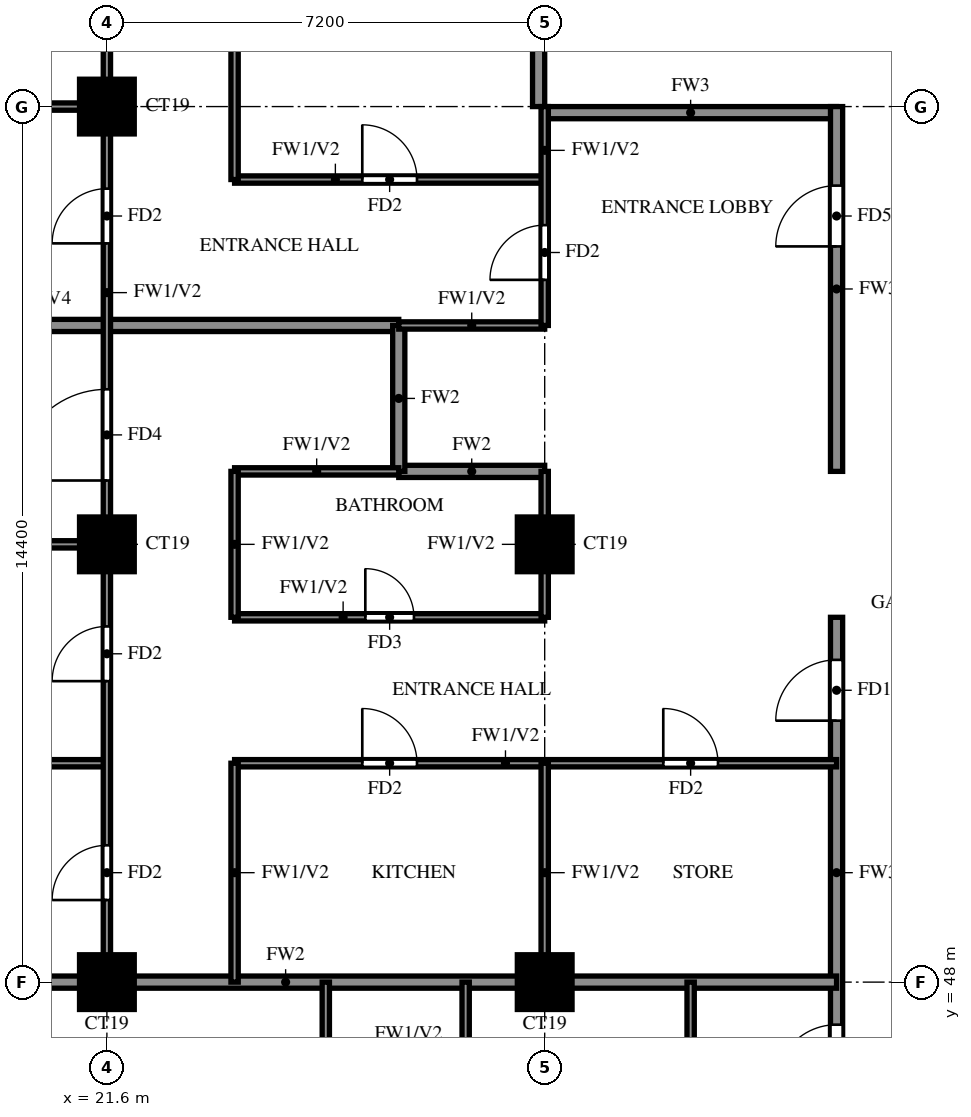
"""IFC4 building model, lengths in metres.
Left out: names, types, materials, properties, quantities, classifications, styles, units other than length and angle.
Written with IfcOpenShell. Run it as: python <this file> out.ifc"""

import sys

from ifc_helpers import new_model, si_unit, direction, frame, frame_2d, origin, origin_2d, place, context, subcontext, project, spatial, rectangle, extrude, source, transform, mapped, element, fill, save


model = new_model("IFC4")
c1 = context("Model", 3, precision=1e-05, world=origin(), true_north=direction((0.0, 1.0)))
c2 = subcontext(c1, "Body", "Model", "MODEL_VIEW")
j1 = project(units=[si_unit("LENGTHUNIT", "METRE"), si_unit("PLANEANGLEUNIT", "RADIAN")], contexts=[c1])
p1 = place(None, origin())
s1 = spatial("IfcSite", under=j1, at=p1, CompositionType="ELEMENT")
p2 = place(p1, origin())
s2 = spatial("IfcBuilding", under=s1, at=p2, CompositionType="ELEMENT")
p3 = place(p2, frame((0.0, 0.0, 185.0)))
s3 = spatial("IfcBuildingStorey", under=s2, at=p3, CompositionType="ELEMENT", Elevation=185.0)
m1 = source(origin(), c2, "Body", "SweptSolid", [
    extrude(rectangle(XDim=0.9, YDim=0.9, at=origin_2d()), origin(), (0.0, 0.0, 1.0), 3.2),
])
for number, where, z_axis, x_axis in (
    (1, (21.6, 48.0, 0.0), (0.0, 0.0, 1.0), (1.0, 0.0, 0.0)),
    (2, (28.8, 48.0, 0.0), (0.0, 0.0, 1.0), (1.0, 0.0, 0.0)),
    (3, (21.6, 55.2, 0.0), (0.0, 0.0, 1.0), (1.0, 0.0, 0.0)),
    (4, (28.8, 55.2, 0.0), (0.0, 0.0, 1.0), (1.0, 0.0, 0.0)),
    (5, (21.6, 62.4, 0.0), (0.0, 0.0, 1.0), (1.0, 0.0, 0.0)),
):
    element("IfcColumn", number, at=place(p3, frame(where, z_axis=z_axis, x_axis=x_axis)), inside=s3, PredefinedType="COLUMN", context=c2, shape_type="MappedRepresentation", body=[
        mapped(m1, transform((0.0, 0.0, 0.0))),
    ])
p4 = place(p3, frame((28.8, 62.3, 0.0), z_axis=(0.0, 0.0, 1.0), x_axis=(1.0, 0.0, 0.0)))
e6 = element("IfcWall", 6, at=p4, inside=s3, PredefinedType="SOLIDWALL", context=c2, shape_type="SweptSolid", body=[
    extrude(rectangle(XDim=4.8, YDim=0.2, at=frame_2d((2.4, 0.0))), origin(), (0.0, 0.0, 1.0), 3.2),
])
p5 = place(p3, frame((28.7, 62.4, 0.0), z_axis=(0.0, 0.0, 1.0), x_axis=(0.0, 1.0, 0.0)))
e7 = element("IfcWall", 7, at=p5, inside=s3, PredefinedType="SOLIDWALL", context=c2, shape_type="SweptSolid", body=[
    extrude(rectangle(XDim=15.6, YDim=0.2, at=frame_2d((7.8, 0.0))), origin(), (0.0, 0.0, 1.0), 3.2),
])
p6 = place(p3, frame((33.6, 45.6, 0.0), z_axis=(0.0, 0.0, 1.0), x_axis=(0.0, 1.0, 0.0)))
e8 = element("IfcWall", 8, at=p6, inside=s3, PredefinedType="SOLIDWALL", context=c2, shape_type="SweptSolid", body=[
    extrude(rectangle(XDim=8.4, YDim=0.2, at=frame_2d((4.2, 0.0))), origin(), (0.0, 0.0, 1.0), 3.2),
])
p7 = place(p6, frame((0.7, 0.0, 0.0)))
e9 = element("IfcOpeningElement", 9, at=p7, cuts=e8, PredefinedType="OPENING", context=c2, shape_type="SweptSolid", body=[
    extrude(rectangle(XDim=1.0, YDim=2.1, at=frame_2d((0.5, 1.05))), frame((0.0, 0.11, 0.0), z_axis=(0.0, -1.0, 0.0), x_axis=(1.0, 0.0, 0.0)), (0.0, 0.0, 1.0), 0.22),
])
p8 = place(p6, frame((6.7, 0.0, 0.0)))
e10 = element("IfcOpeningElement", 10, at=p8, cuts=e8, PredefinedType="OPENING", context=c2, shape_type="SweptSolid", body=[
    extrude(rectangle(XDim=1.0, YDim=2.1, at=frame_2d((0.5, 1.05))), frame((0.0, 0.11, 0.0), z_axis=(0.0, -1.0, 0.0), x_axis=(1.0, 0.0, 0.0)), (0.0, 0.0, 1.0), 0.22),
])
p9 = place(p3, frame((33.6, 56.4, 0.0), z_axis=(0.0, 0.0, 1.0), x_axis=(0.0, 1.0, 0.0)))
e11 = element("IfcWall", 11, at=p9, inside=s3, PredefinedType="SOLIDWALL", context=c2, shape_type="SweptSolid", body=[
    extrude(rectangle(XDim=6.0, YDim=0.2, at=frame_2d((3.0, 0.0))), origin(), (0.0, 0.0, 1.0), 3.2),
])
p10 = place(p9, frame((3.7, 0.0, 0.0)))
e12 = element("IfcOpeningElement", 12, at=p10, cuts=e11, PredefinedType="OPENING", context=c2, shape_type="SweptSolid", body=[
    extrude(rectangle(XDim=1.0, YDim=2.1, at=frame_2d((0.5, 1.05))), frame((0.0, 0.11, 0.0), z_axis=(0.0, -1.0, 0.0), x_axis=(1.0, 0.0, 0.0)), (0.0, 0.0, 1.0), 0.22),
])
p11 = place(p3, frame((14.525, 48.0, 0.0), z_axis=(0.0, 0.0, 1.0), x_axis=(1.0, 0.0, 0.0)))
e13 = element("IfcWall", 13, at=p11, inside=s3, PredefinedType="SOLIDWALL", context=c2, shape_type="SweptSolid", body=[
    extrude(rectangle(XDim=19.075, YDim=0.2, at=frame_2d((9.538, 0.0))), origin(), (0.0, 0.0, 1.0), 3.2),
])
p12 = place(p3, frame((26.4, 56.4, 0.0), z_axis=(0.0, 0.0, 1.0), x_axis=(1.0, 0.0, 0.0)))
e14 = element("IfcWall", 14, at=p12, inside=s3, PredefinedType="SOLIDWALL", context=c2, shape_type="SweptSolid", body=[
    extrude(rectangle(XDim=2.4, YDim=0.2, at=frame_2d((1.2, 0.0))), origin(), (0.0, 0.0, 1.0), 3.2),
])
p13 = place(p3, frame((14.525, 58.8, 0.0), z_axis=(0.0, 0.0, 1.0), x_axis=(1.0, 0.0, 0.0)))
e15 = element("IfcWall", 15, at=p13, inside=s3, PredefinedType="SOLIDWALL", context=c2, shape_type="SweptSolid", body=[
    extrude(rectangle(XDim=11.875, YDim=0.2, at=frame_2d((5.938, 0.0))), origin(), (0.0, 0.0, 1.0), 2.3),
])
p14 = place(p3, frame((26.4, 56.4, 0.0), z_axis=(0.0, 0.0, 1.0), x_axis=(0.0, 1.0, 0.0)))
e16 = element("IfcWall", 16, at=p14, inside=s3, PredefinedType="SOLIDWALL", context=c2, shape_type="SweptSolid", body=[
    extrude(rectangle(XDim=2.4, YDim=0.2, at=frame_2d((1.2, 0.0))), origin(), (0.0, 0.0, 1.0), 3.2),
])
p15 = place(p3, frame((14.525, 51.6, 0.0), z_axis=(0.0, 0.0, 1.0), x_axis=(1.0, 0.0, 0.0)))
e17 = element("IfcWall", 17, at=p15, inside=s3, PredefinedType="PARTITIONING", context=c2, shape_type="SweptSolid", body=[
    extrude(rectangle(XDim=7.075, YDim=0.12, at=frame_2d((3.538, 0.0))), origin(), (0.0, 0.0, 1.0), 2.3),
])
p16 = place(p3, frame((23.7, 51.6, 0.0), z_axis=(0.0, 0.0, 1.0), x_axis=(1.0, 0.0, 0.0)))
e18 = element("IfcWall", 18, at=p16, inside=s3, PredefinedType="PARTITIONING", context=c2, shape_type="SweptSolid", body=[
    extrude(rectangle(XDim=9.9, YDim=0.12, at=frame_2d((4.95, 0.0))), origin(), (0.0, 0.0, 1.0), 3.2),
])
p17 = place(p16, frame((2.1, 0.0, 0.0)))
e19 = element("IfcOpeningElement", 19, at=p17, cuts=e18, PredefinedType="OPENING", context=c2, shape_type="SweptSolid", body=[
    extrude(rectangle(XDim=0.9, YDim=2.1, at=frame_2d((0.45, 1.05))), frame((0.0, 0.07, 0.0), z_axis=(0.0, -1.0, 0.0), x_axis=(1.0, 0.0, 0.0)), (0.0, 0.0, 1.0), 0.14),
])
p18 = place(p16, frame((7.05, 0.0, 0.0)))
e20 = element("IfcOpeningElement", 20, at=p18, cuts=e18, PredefinedType="OPENING", context=c2, shape_type="SweptSolid", body=[
    extrude(rectangle(XDim=0.9, YDim=2.1, at=frame_2d((0.45, 1.05))), frame((0.0, 0.07, 0.0), z_axis=(0.0, -1.0, 0.0), x_axis=(1.0, 0.0, 0.0)), (0.0, 0.0, 1.0), 0.14),
])
p19 = place(p3, frame((23.7, 54.0, 0.0), z_axis=(0.0, 0.0, 1.0), x_axis=(1.0, 0.0, 0.0)))
e21 = element("IfcWall", 21, at=p19, inside=s3, PredefinedType="PARTITIONING", context=c2, shape_type="SweptSolid", body=[
    extrude(rectangle(XDim=5.1, YDim=0.12, at=frame_2d((2.55, 0.0))), origin(), (0.0, 0.0, 1.0), 3.2),
])
p20 = place(p19, frame((2.15, 0.0, 0.0)))
e22 = element("IfcOpeningElement", 22, at=p20, cuts=e21, PredefinedType="OPENING", context=c2, shape_type="SweptSolid", body=[
    extrude(rectangle(XDim=0.8, YDim=2.1, at=frame_2d((0.4, 1.05))), frame((0.0, 0.07, 0.0), z_axis=(0.0, -1.0, 0.0), x_axis=(1.0, 0.0, 0.0)), (0.0, 0.0, 1.0), 0.14),
])
p21 = place(p3, frame((14.525, 55.2, 0.0), z_axis=(0.0, 0.0, 1.0), x_axis=(1.0, 0.0, 0.0)))
e23 = element("IfcWall", 23, at=p21, inside=s3, PredefinedType="PARTITIONING", context=c2, shape_type="SweptSolid", body=[
    extrude(rectangle(XDim=7.075, YDim=0.12, at=frame_2d((3.538, 0.0))), origin(), (0.0, 0.0, 1.0), 3.2),
])
p22 = place(p3, frame((23.7, 56.4, 0.0), z_axis=(0.0, 0.0, 1.0), x_axis=(1.0, 0.0, 0.0)))
e24 = element("IfcWall", 24, at=p22, inside=s3, PredefinedType="PARTITIONING", context=c2, shape_type="SweptSolid", body=[
    extrude(rectangle(XDim=2.7, YDim=0.12, at=frame_2d((1.35, 0.0))), origin(), (0.0, 0.0, 1.0), 3.2),
])
p23 = place(p3, frame((26.4, 58.8, 0.0), z_axis=(0.0, 0.0, 1.0), x_axis=(1.0, 0.0, 0.0)))
e25 = element("IfcWall", 25, at=p23, inside=s3, PredefinedType="PARTITIONING", context=c2, shape_type="SweptSolid", body=[
    extrude(rectangle(XDim=2.4, YDim=0.12, at=frame_2d((1.2, 0.0))), origin(), (0.0, 0.0, 1.0), 3.2),
])
p24 = place(p3, frame((23.7, 61.2, 0.0), z_axis=(0.0, 0.0, 1.0), x_axis=(1.0, 0.0, 0.0)))
e26 = element("IfcWall", 26, at=p24, inside=s3, PredefinedType="PARTITIONING", context=c2, shape_type="SweptSolid", body=[
    extrude(rectangle(XDim=5.1, YDim=0.12, at=frame_2d((2.55, 0.0))), origin(), (0.0, 0.0, 1.0), 3.2),
])
p25 = place(p24, frame((2.1, 0.0, 0.0)))
e27 = element("IfcOpeningElement", 27, at=p25, cuts=e26, PredefinedType="OPENING", context=c2, shape_type="SweptSolid", body=[
    extrude(rectangle(XDim=0.9, YDim=2.1, at=frame_2d((0.45, 1.05))), frame((0.0, 0.07, 0.0), z_axis=(0.0, -1.0, 0.0), x_axis=(1.0, 0.0, 0.0)), (0.0, 0.0, 1.0), 0.14),
])
p26 = place(p3, frame((14.525, 62.4, 0.0), z_axis=(0.0, 0.0, 1.0), x_axis=(1.0, 0.0, 0.0)))
e28 = element("IfcWall", 28, at=p26, inside=s3, PredefinedType="PARTITIONING", context=c2, shape_type="SweptSolid", body=[
    extrude(rectangle(XDim=7.075, YDim=0.12, at=frame_2d((3.538, 0.0))), origin(), (0.0, 0.0, 1.0), 3.2),
])
p27 = place(p3, frame((21.6, 48.0, 0.0), z_axis=(0.0, 0.0, 1.0), x_axis=(0.0, 1.0, 0.0)))
e29 = element("IfcWall", 29, at=p27, inside=s3, PredefinedType="PARTITIONING", context=c2, shape_type="SweptSolid", body=[
    extrude(rectangle(XDim=25.2, YDim=0.12, at=frame_2d((12.6, 0.0))), origin(), (0.0, 0.0, 1.0), 3.2),
])
p28 = place(p27, frame((1.35, 0.0, 0.0)))
e30 = element("IfcOpeningElement", 30, at=p28, cuts=e29, PredefinedType="OPENING", context=c2, shape_type="SweptSolid", body=[
    extrude(rectangle(XDim=0.9, YDim=2.1, at=frame_2d((0.45, 1.05))), frame((0.0, 0.07, 0.0), z_axis=(0.0, -1.0, 0.0), x_axis=(1.0, 0.0, 0.0)), (0.0, 0.0, 1.0), 0.14),
])
p29 = place(p27, frame((4.95, 0.0, 0.0)))
e31 = element("IfcOpeningElement", 31, at=p29, cuts=e29, PredefinedType="OPENING", context=c2, shape_type="SweptSolid", body=[
    extrude(rectangle(XDim=0.9, YDim=2.1, at=frame_2d((0.45, 1.05))), frame((0.0, 0.07, 0.0), z_axis=(0.0, -1.0, 0.0), x_axis=(1.0, 0.0, 0.0)), (0.0, 0.0, 1.0), 0.14),
])
p30 = place(p27, frame((8.25, 0.0, 0.0)))
e32 = element("IfcOpeningElement", 32, at=p30, cuts=e29, PredefinedType="OPENING", context=c2, shape_type="SweptSolid", body=[
    extrude(rectangle(XDim=1.5, YDim=2.1, at=frame_2d((0.75, 1.05))), frame((0.0, 0.07, 0.0), z_axis=(0.0, -1.0, 0.0), x_axis=(1.0, 0.0, 0.0)), (0.0, 0.0, 1.0), 0.14),
])
p31 = place(p27, frame((12.15, 0.0, 0.0)))
e33 = element("IfcOpeningElement", 33, at=p31, cuts=e29, PredefinedType="OPENING", context=c2, shape_type="SweptSolid", body=[
    extrude(rectangle(XDim=0.9, YDim=2.1, at=frame_2d((0.45, 1.05))), frame((0.0, 0.07, 0.0), z_axis=(0.0, -1.0, 0.0), x_axis=(1.0, 0.0, 0.0)), (0.0, 0.0, 1.0), 0.14),
])
p32 = place(p27, frame((15.75, 0.0, 0.0)))
e34 = element("IfcOpeningElement", 34, at=p32, cuts=e29, PredefinedType="OPENING", context=c2, shape_type="SweptSolid", body=[
    extrude(rectangle(XDim=0.9, YDim=2.1, at=frame_2d((0.45, 1.05))), frame((0.0, 0.07, 0.0), z_axis=(0.0, -1.0, 0.0), x_axis=(1.0, 0.0, 0.0)), (0.0, 0.0, 1.0), 0.14),
])
p33 = place(p27, frame((19.35, 0.0, 0.0)))
e35 = element("IfcOpeningElement", 35, at=p33, cuts=e29, PredefinedType="OPENING", context=c2, shape_type="SweptSolid", body=[
    extrude(rectangle(XDim=0.9, YDim=2.1, at=frame_2d((0.45, 1.05))), frame((0.0, 0.07, 0.0), z_axis=(0.0, -1.0, 0.0), x_axis=(1.0, 0.0, 0.0)), (0.0, 0.0, 1.0), 0.14),
])
p34 = place(p27, frame((22.95, 0.0, 0.0)))
e36 = element("IfcOpeningElement", 36, at=p34, cuts=e29, PredefinedType="OPENING", context=c2, shape_type="SweptSolid", body=[
    extrude(rectangle(XDim=0.9, YDim=2.1, at=frame_2d((0.45, 1.05))), frame((0.0, 0.07, 0.0), z_axis=(0.0, -1.0, 0.0), x_axis=(1.0, 0.0, 0.0)), (0.0, 0.0, 1.0), 0.14),
])
p35 = place(p3, frame((23.7, 48.0, 0.0), z_axis=(0.0, 0.0, 1.0), x_axis=(0.0, 1.0, 0.0)))
e37 = element("IfcWall", 37, at=p35, inside=s3, PredefinedType="PARTITIONING", context=c2, shape_type="SweptSolid", body=[
    extrude(rectangle(XDim=3.6, YDim=0.12, at=frame_2d((1.8, 0.0))), origin(), (0.0, 0.0, 1.0), 3.2),
])
p36 = place(p3, frame((23.7, 54.0, 0.0), z_axis=(0.0, 0.0, 1.0), x_axis=(0.0, 1.0, 0.0)))
e38 = element("IfcWall", 38, at=p36, inside=s3, PredefinedType="PARTITIONING", context=c2, shape_type="SweptSolid", body=[
    extrude(rectangle(XDim=2.4, YDim=0.12, at=frame_2d((1.2, 0.0))), origin(), (0.0, 0.0, 1.0), 3.2),
])
p37 = place(p3, frame((23.7, 61.2, 0.0), z_axis=(0.0, 0.0, 1.0), x_axis=(0.0, 1.0, 0.0)))
e39 = element("IfcWall", 39, at=p37, inside=s3, PredefinedType="PARTITIONING", context=c2, shape_type="SweptSolid", body=[
    extrude(rectangle(XDim=12.0, YDim=0.12, at=frame_2d((6.0, 0.0))), origin(), (0.0, 0.0, 1.0), 3.2),
])
p38 = place(p37, frame((5.5, 0.0, 0.0)))
e40 = element("IfcOpeningElement", 40, at=p38, cuts=e39, PredefinedType="OPENING", context=c2, shape_type="SweptSolid", body=[
    extrude(rectangle(XDim=0.8, YDim=2.1, at=frame_2d((0.4, 1.05))), frame((0.0, 0.07, 0.0), z_axis=(0.0, -1.0, 0.0), x_axis=(1.0, 0.0, 0.0)), (0.0, 0.0, 1.0), 0.14),
])
p39 = place(p37, frame((9.125, 0.0, 0.0)))
e41 = element("IfcOpeningElement", 41, at=p39, cuts=e39, PredefinedType="OPENING", context=c2, shape_type="SweptSolid", body=[
    extrude(rectangle(XDim=0.9, YDim=2.1, at=frame_2d((0.45, 1.05))), frame((0.0, 0.07, 0.0), z_axis=(0.0, -1.0, 0.0), x_axis=(1.0, 0.0, 0.0)), (0.0, 0.0, 1.0), 0.14),
])
p40 = place(p3, frame((25.2, 39.725, 0.0), z_axis=(0.0, 0.0, 1.0), x_axis=(0.0, 1.0, 0.0)))
e42 = element("IfcWall", 42, at=p40, inside=s3, PredefinedType="PARTITIONING", context=c2, shape_type="SweptSolid", body=[
    extrude(rectangle(XDim=8.275, YDim=0.12, at=frame_2d((4.137, 0.0))), origin(), (0.0, 0.0, 1.0), 3.2),
])
p41 = place(p40, frame((4.525, 0.0, 0.0)))
e43 = element("IfcOpeningElement", 43, at=p41, cuts=e42, PredefinedType="OPENING", context=c2, shape_type="SweptSolid", body=[
    extrude(rectangle(XDim=0.9, YDim=2.1, at=frame_2d((0.45, 1.05))), frame((0.0, 0.07, 0.0), z_axis=(0.0, -1.0, 0.0), x_axis=(1.0, 0.0, 0.0)), (0.0, 0.0, 1.0), 0.14),
])
p42 = place(p3, frame((27.5, 45.6, 0.0), z_axis=(0.0, 0.0, 1.0), x_axis=(0.0, 1.0, 0.0)))
e44 = element("IfcWall", 44, at=p42, inside=s3, PredefinedType="PARTITIONING", context=c2, shape_type="SweptSolid", body=[
    extrude(rectangle(XDim=2.4, YDim=0.12, at=frame_2d((1.2, 0.0))), origin(), (0.0, 0.0, 1.0), 3.2),
])
p43 = place(p3, frame((28.8, 48.0, 0.0), z_axis=(0.0, 0.0, 1.0), x_axis=(0.0, 1.0, 0.0)))
e45 = element("IfcWall", 45, at=p43, inside=s3, PredefinedType="PARTITIONING", context=c2, shape_type="SweptSolid", body=[
    extrude(rectangle(XDim=3.6, YDim=0.12, at=frame_2d((1.8, 0.0))), origin(), (0.0, 0.0, 1.0), 3.2),
])
p44 = place(p3, frame((28.8, 54.0, 0.0), z_axis=(0.0, 0.0, 1.0), x_axis=(0.0, 1.0, 0.0)))
e46 = element("IfcWall", 46, at=p44, inside=s3, PredefinedType="PARTITIONING", context=c2, shape_type="SweptSolid", body=[
    extrude(rectangle(XDim=2.4, YDim=0.12, at=frame_2d((1.2, 0.0))), origin(), (0.0, 0.0, 1.0), 3.2),
])
p45 = place(p3, frame((28.8, 58.8, 0.0), z_axis=(0.0, 0.0, 1.0), x_axis=(0.0, 1.0, 0.0)))
e47 = element("IfcWall", 47, at=p45, inside=s3, PredefinedType="PARTITIONING", context=c2, shape_type="SweptSolid", body=[
    extrude(rectangle(XDim=3.6, YDim=0.12, at=frame_2d((1.8, 0.0))), origin(), (0.0, 0.0, 1.0), 3.2),
])
p46 = place(p45, frame((0.75, 0.0, 0.0)))
e48 = element("IfcOpeningElement", 48, at=p46, cuts=e47, PredefinedType="OPENING", context=c2, shape_type="SweptSolid", body=[
    extrude(rectangle(XDim=0.9, YDim=2.1, at=frame_2d((0.45, 1.05))), frame((0.0, 0.07, 0.0), z_axis=(0.0, -1.0, 0.0), x_axis=(1.0, 0.0, 0.0)), (0.0, 0.0, 1.0), 0.14),
])
p47 = place(p3, frame((31.2, 45.6, 0.0), z_axis=(0.0, 0.0, 1.0), x_axis=(0.0, 1.0, 0.0)))
e49 = element("IfcWall", 49, at=p47, inside=s3, PredefinedType="PARTITIONING", context=c2, shape_type="SweptSolid", body=[
    extrude(rectangle(XDim=2.4, YDim=0.12, at=frame_2d((1.2, 0.0))), origin(), (0.0, 0.0, 1.0), 3.2),
])
p48 = place(p7, origin())
e50 = element("IfcDoor", 50, at=p48, inside=s3, OperationType="SINGLE_SWING_LEFT", PredefinedType="DOOR", context=c2, shape_type="SweptSolid", body=[
    extrude(rectangle(XDim=1.0, YDim=2.1, at=frame_2d((0.5, 1.05))), frame((0.0, 0.025, 0.0), z_axis=(0.0, -1.0, 0.0), x_axis=(1.0, 0.0, 0.0)), (0.0, 0.0, 1.0), 0.05),
])
fill(e9, e50)
p49 = place(p8, origin())
e51 = element("IfcDoor", 51, at=p49, inside=s3, OperationType="SINGLE_SWING_LEFT", PredefinedType="DOOR", context=c2, shape_type="SweptSolid", body=[
    extrude(rectangle(XDim=1.0, YDim=2.1, at=frame_2d((0.5, 1.05))), frame((0.0, 0.025, 0.0), z_axis=(0.0, -1.0, 0.0), x_axis=(1.0, 0.0, 0.0)), (0.0, 0.0, 1.0), 0.05),
])
fill(e10, e51)
p50 = place(p28, origin())
e52 = element("IfcDoor", 52, at=p50, inside=s3, OperationType="SINGLE_SWING_RIGHT", PredefinedType="DOOR", context=c2, shape_type="SweptSolid", body=[
    extrude(rectangle(XDim=0.9, YDim=2.1, at=frame_2d((0.45, 1.05))), frame((0.0, 0.025, 0.0), z_axis=(0.0, -1.0, 0.0), x_axis=(1.0, 0.0, 0.0)), (0.0, 0.0, 1.0), 0.05),
])
fill(e30, e52)
p51 = place(p29, origin())
e53 = element("IfcDoor", 53, at=p51, inside=s3, OperationType="SINGLE_SWING_LEFT", PredefinedType="DOOR", context=c2, shape_type="SweptSolid", body=[
    extrude(rectangle(XDim=0.9, YDim=2.1, at=frame_2d((0.45, 1.05))), frame((0.0, 0.025, 0.0), z_axis=(0.0, -1.0, 0.0), x_axis=(1.0, 0.0, 0.0)), (0.0, 0.0, 1.0), 0.05),
])
fill(e31, e53)
p52 = place(p30, origin())
e54 = element("IfcDoor", 54, at=p52, inside=s3, OperationType="SINGLE_SWING_LEFT", PredefinedType="DOOR", context=c2, shape_type="SweptSolid", body=[
    extrude(rectangle(XDim=1.5, YDim=2.1, at=frame_2d((0.75, 1.05))), frame((0.0, 0.025, 0.0), z_axis=(0.0, -1.0, 0.0), x_axis=(1.0, 0.0, 0.0)), (0.0, 0.0, 1.0), 0.05),
])
fill(e32, e54)
p53 = place(p17, origin())
e55 = element("IfcDoor", 55, at=p53, inside=s3, OperationType="SINGLE_SWING_RIGHT", PredefinedType="DOOR", context=c2, shape_type="SweptSolid", body=[
    extrude(rectangle(XDim=0.9, YDim=2.1, at=frame_2d((0.45, 1.05))), frame((0.0, 0.025, 0.0), z_axis=(0.0, -1.0, 0.0), x_axis=(1.0, 0.0, 0.0)), (0.0, 0.0, 1.0), 0.05),
])
fill(e19, e55)
p54 = place(p20, origin())
e56 = element("IfcDoor", 56, at=p54, inside=s3, OperationType="SINGLE_SWING_LEFT", PredefinedType="DOOR", context=c2, shape_type="SweptSolid", body=[
    extrude(rectangle(XDim=0.8, YDim=2.1, at=frame_2d((0.4, 1.05))), frame((0.0, 0.025, 0.0), z_axis=(0.0, -1.0, 0.0), x_axis=(1.0, 0.0, 0.0)), (0.0, 0.0, 1.0), 0.05),
])
fill(e22, e56)
p55 = place(p18, origin())
e57 = element("IfcDoor", 57, at=p55, inside=s3, OperationType="SINGLE_SWING_LEFT", PredefinedType="DOOR", context=c2, shape_type="SweptSolid", body=[
    extrude(rectangle(XDim=0.9, YDim=2.1, at=frame_2d((0.45, 1.05))), frame((0.0, 0.025, 0.0), z_axis=(0.0, -1.0, 0.0), x_axis=(1.0, 0.0, 0.0)), (0.0, 0.0, 1.0), 0.05),
])
fill(e20, e57)
p56 = place(p46, origin())
e58 = element("IfcDoor", 58, at=p56, inside=s3, OperationType="SINGLE_SWING_RIGHT", PredefinedType="DOOR", context=c2, shape_type="SweptSolid", body=[
    extrude(rectangle(XDim=0.9, YDim=2.1, at=frame_2d((0.45, 1.05))), frame((0.0, 0.025, 0.0), z_axis=(0.0, -1.0, 0.0), x_axis=(1.0, 0.0, 0.0)), (0.0, 0.0, 1.0), 0.05),
])
fill(e48, e58)
p57 = place(p10, origin())
e59 = element("IfcDoor", 59, at=p57, inside=s3, OperationType="SINGLE_SWING_LEFT", PredefinedType="DOOR", context=c2, shape_type="SweptSolid", body=[
    extrude(rectangle(XDim=1.0, YDim=2.1, at=frame_2d((0.5, 1.05))), frame((0.0, 0.025, 0.0), z_axis=(0.0, -1.0, 0.0), x_axis=(1.0, 0.0, 0.0)), (0.0, 0.0, 1.0), 0.05),
])
fill(e12, e59)
p58 = place(p31, origin())
e60 = element("IfcDoor", 60, at=p58, inside=s3, OperationType="SINGLE_SWING_LEFT", PredefinedType="DOOR", context=c2, shape_type="SweptSolid", body=[
    extrude(rectangle(XDim=0.9, YDim=2.1, at=frame_2d((0.45, 1.05))), frame((0.0, 0.025, 0.0), z_axis=(0.0, -1.0, 0.0), x_axis=(1.0, 0.0, 0.0)), (0.0, 0.0, 1.0), 0.05),
])
fill(e33, e60)
p59 = place(p25, origin())
e61 = element("IfcDoor", 61, at=p59, inside=s3, OperationType="SINGLE_SWING_LEFT", PredefinedType="DOOR", context=c2, shape_type="SweptSolid", body=[
    extrude(rectangle(XDim=0.9, YDim=2.1, at=frame_2d((0.45, 1.05))), frame((0.0, 0.025, 0.0), z_axis=(0.0, -1.0, 0.0), x_axis=(1.0, 0.0, 0.0)), (0.0, 0.0, 1.0), 0.05),
])
fill(e27, e61)
save(model, sys.argv[1])
